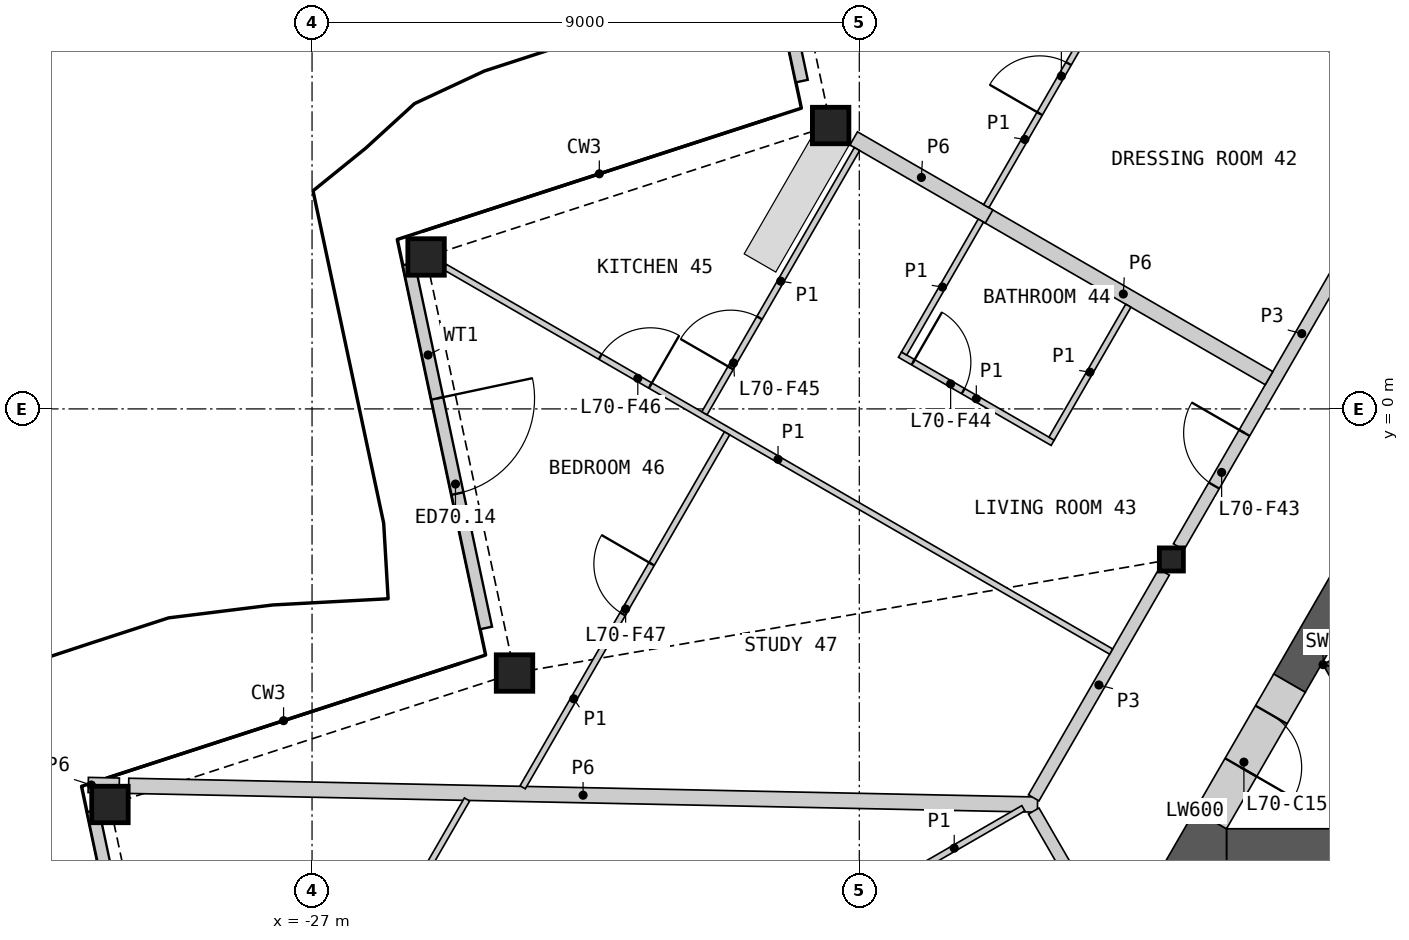
"""IFC4 building model, lengths in metres.
Left out: names, types, materials, properties, quantities, classifications, styles, units other than length and angle.
Written with IfcOpenShell. Run it as: python <this file> out.ifc"""

import sys

from ifc_helpers import new_model, si_unit, direction, frame, frame_2d, origin, origin_2d, place, context, subcontext, project, spatial, polyline, rectangle, hollow_rectangle, i_section, outline, extrude, element, fill, save


model = new_model("IFC4")
c1 = context("Model", 3, precision=1e-05, world=origin(), true_north=direction((0.0, 1.0)))
c2 = subcontext(c1, "Body", "Model", "MODEL_VIEW")
j1 = project(units=[si_unit("LENGTHUNIT", "METRE"), si_unit("PLANEANGLEUNIT", "RADIAN")], contexts=[c1])
p1 = place(None, origin())
s1 = spatial("IfcSite", under=j1, at=p1, CompositionType="ELEMENT")
p2 = place(p1, origin())
s2 = spatial("IfcBuilding", under=s1, at=p2, CompositionType="ELEMENT")
p3 = place(p2, frame((0.0, 0.0, 318.8)))
s3 = spatial("IfcBuildingStorey", under=s2, at=p3, CompositionType="ELEMENT", Elevation=318.8)
for number, where, z_axis, x_axis in (
    (1, (-18.471, 4.661, 0.0), (0.0, 0.0, 1.0), (1.0, 0.0, 0.0)),
    (2, (-25.125, 2.499, 0.0), (0.0, 0.0, 1.0), (1.0, 0.0, 0.0)),
    (3, (-23.67, -4.344, 0.0), (0.0, 0.0, 1.0), (1.0, 0.0, 0.0)),
    (4, (-30.324, -6.506, 0.0), (0.0, 0.0, 1.0), (1.0, 0.0, 0.0)),
):
    element("IfcColumn", number, at=place(p3, frame(where, z_axis=z_axis, x_axis=x_axis)), inside=s3, PredefinedType="COLUMN", context=c2, shape_type="SweptSolid", body=[
        extrude(hollow_rectangle(XDim=0.6, YDim=0.6, WallThickness=0.04, at=origin_2d()), origin(), (0.0, 0.0, 1.0), 3.4),
    ])
p4 = place(p3, frame((-12.868, -2.476, 0.0), z_axis=(0.0, 0.0, 1.0), x_axis=(1.0, 0.0, 0.0)))
e5 = element("IfcColumn", 5, at=p4, inside=s3, PredefinedType="COLUMN", context=c2, shape_type="SweptSolid", body=[
    extrude(i_section(OverallWidth=0.396, OverallDepth=0.381, WebThickness=0.019, FlangeThickness=0.03, at=origin_2d()), origin(), (0.0, 0.0, 1.0), 3.4),
])
p5 = place(p3, frame((-20.217, 11.377, 0.0), z_axis=(0.0, 0.0, 1.0), x_axis=(0.207885951908, -0.978153071354, 0.0)))
e6 = element("IfcWall", 6, at=p5, inside=s3, PredefinedType="SOLIDWALL", context=c2, shape_type="SweptSolid", body=[
    extrude(rectangle(XDim=6.12, YDim=0.2, at=frame_2d((3.06, 0.0))), origin(), (0.0, 0.0, 1.0), 2.488),
])
p6 = place(p5, frame((2.26, 0.0, 0.0)))
e7 = element("IfcOpeningElement", 7, at=p6, cuts=e6, PredefinedType="OPENING", context=c2, shape_type="SweptSolid", body=[
    extrude(rectangle(XDim=1.6, YDim=2.25, at=frame_2d((0.8, 1.125))), frame((0.0, 0.11, 0.0), z_axis=(0.0, -1.0, 0.0), x_axis=(1.0, 0.0, 0.0)), (0.0, 0.0, 1.0), 0.22),
])
p7 = place(p3, frame((-25.41, 2.383, 0.0), z_axis=(0.0, 0.0, 1.0), x_axis=(0.207894064368, -0.978151347185, 0.0)))
e8 = element("IfcWall", 8, at=p7, inside=s3, PredefinedType="SOLIDWALL", context=c2, shape_type="SweptSolid", body=[
    extrude(rectangle(XDim=6.12, YDim=0.2, at=frame_2d((3.06, 0.0))), origin(), (0.0, 0.0, 1.0), 2.488),
])
p8 = place(p7, frame((2.26, 0.0, 0.0)))
e9 = element("IfcOpeningElement", 9, at=p8, cuts=e8, PredefinedType="OPENING", context=c2, shape_type="SweptSolid", body=[
    extrude(rectangle(XDim=1.6, YDim=2.25, at=frame_2d((0.8, 1.125))), frame((0.0, 0.11, 0.0), z_axis=(0.0, -1.0, 0.0), x_axis=(1.0, 0.0, 0.0)), (0.0, 0.0, 1.0), 0.22),
])
p9 = place(p3, frame((-30.603, -6.611, 0.0), z_axis=(0.0, 0.0, 1.0), x_axis=(0.207921893309, -0.978145432072, 0.0)))
e10 = element("IfcWall", 10, at=p9, inside=s3, PredefinedType="SOLIDWALL", context=c2, shape_type="SweptSolid", body=[
    extrude(rectangle(XDim=6.475, YDim=0.2, at=frame_2d((3.237, 0.0))), origin(), (0.0, 0.0, 1.0), 2.488),
])
p10 = place(p9, frame((2.26, 0.0, 0.0)))
e11 = element("IfcOpeningElement", 11, at=p10, cuts=e10, PredefinedType="OPENING", context=c2, shape_type="SweptSolid", body=[
    extrude(rectangle(XDim=1.6, YDim=2.25, at=frame_2d((0.8, 1.125))), frame((0.0, 0.11, 0.0), z_axis=(0.0, -1.0, 0.0), x_axis=(1.0, 0.0, 0.0)), (0.0, 0.0, 1.0), 0.22),
])
p11 = place(p3, origin())
e12 = element("IfcWall", 12, at=p11, inside=s3, PredefinedType="SHEAR", context=c2, shape_type="SweptSolid", body=[
    extrude(outline(polyline([(-5.307, -1.281), (-10.374, -4.206), (-10.032, -4.298), (-5.182, -1.498), (-5.307, -1.281)])), origin(), (0.0, 0.0, 1.0), 3.1),
])
p12 = place(p3, origin())
e13 = element("IfcWall", 13, at=p12, inside=s3, PredefinedType="SHEAR", context=c2, shape_type="SweptSolid", body=[
    extrude(outline(polyline([(-10.374, -4.206), (-8.83, -6.881), (-8.738, -6.539), (-10.032, -4.298), (-10.374, -4.206)])), origin(), (0.0, 0.0, 1.0), 3.1),
])
p13 = place(p3, frame((-11.961, -7.206, 0.0), z_axis=(0.0, 0.0, 1.0), x_axis=(1.0, 0.0, 0.0)))
e14 = element("IfcWall", 14, at=p13, inside=s3, PredefinedType="SHEAR", context=c2, shape_type="SweptSolid", body=[
    extrude(rectangle(XDim=23.921, YDim=0.6, at=frame_2d((11.961, 0.0))), origin(), (0.0, 0.0, 1.0), 3.1),
])
p14 = place(p3, frame((-8.44, -0.208, 0.0), z_axis=(0.0, 0.0, 1.0), x_axis=(-0.500007425856, -0.866021116422, 0.0)))
e15 = element("IfcWall", 15, at=p14, inside=s3, PredefinedType="SHEAR", context=c2, shape_type="SweptSolid", body=[
    extrude(rectangle(XDim=4.969, YDim=0.6, at=frame_2d((2.484, 0.0))), origin(), (0.0, 0.0, 1.0), 3.1),
])
p15 = place(p3, origin())
e16 = element("IfcWall", 16, at=p15, inside=s3, PredefinedType="SHEAR", context=c2, shape_type="SweptSolid", body=[
    extrude(outline(polyline([(-12.48, -6.606), (-11.961, -6.906), (-11.961, -7.506), (-13.0, -7.506), (-12.48, -6.606)])), origin(), (0.0, 0.0, 1.0), 3.1),
])
p16 = place(p3, frame((-10.925, -4.511, 0.0), z_axis=(0.0, 0.0, 1.0), x_axis=(-0.500018667571, -0.866014625789, 0.0)))
e17 = element("IfcWall", 17, at=p16, inside=s3, PredefinedType="SHEAR", context=c2, shape_type="SweptSolid", body=[
    extrude(rectangle(XDim=2.592, YDim=0.6, at=frame_2d((1.296, 0.0))), origin(), (0.0, 0.0, 1.0), 3.1),
])
p17 = place(p16, frame((0.6, 0.0, 0.0)))
e18 = element("IfcOpeningElement", 18, at=p17, cuts=e17, PredefinedType="OPENING", context=c2, shape_type="SweptSolid", body=[
    extrude(rectangle(XDim=1.0, YDim=2.1, at=frame_2d((0.5, 1.05))), frame((0.0, 0.31, 0.0), z_axis=(0.0, -1.0, 0.0), x_axis=(1.0, 0.0, 0.0)), (0.0, 0.0, 1.0), 0.62),
])
p18 = place(p3, frame((-30.016, -6.199, 0.0), z_axis=(0.0, 0.0, 1.0), x_axis=(0.999786619639, -0.02065708573, 0.0)))
e19 = element("IfcWall", 19, at=p18, inside=s3, PredefinedType="PARTITIONING", context=c2, shape_type="SweptSolid", body=[
    extrude(rectangle(XDim=14.951, YDim=0.25, at=frame_2d((7.475, 0.0))), origin(), (0.0, 0.0, 1.0), 2.33),
])
p19 = place(p3, frame((-12.748, -2.269, 0.0), z_axis=(0.0, 0.0, 1.0), x_axis=(0.499984266882, 0.866034487114, 0.0)))
e20 = element("IfcWall", 20, at=p19, inside=s3, PredefinedType="PARTITIONING", context=c2, shape_type="SweptSolid", body=[
    extrude(rectangle(XDim=8.099, YDim=0.2, at=frame_2d((4.049, 0.0))), origin(), (0.0, 0.0, 1.0), 3.1),
])
p20 = place(p19, frame((1.164, 0.0, 0.0)))
e21 = element("IfcOpeningElement", 21, at=p20, cuts=e20, PredefinedType="OPENING", context=c2, shape_type="SweptSolid", body=[
    extrude(rectangle(XDim=1.0, YDim=2.1, at=frame_2d((0.5, 1.05))), frame((0.0, 0.11, 0.0), z_axis=(0.0, -1.0, 0.0), x_axis=(1.0, 0.0, 0.0)), (0.0, 0.0, 1.0), 0.22),
])
p21 = place(p3, frame((-16.055, 3.273, 0.0), z_axis=(0.0, 0.0, 1.0), x_axis=(0.866019581949, -0.500010083578, 0.0)))
e22 = element("IfcWall", 22, at=p21, inside=s3, PredefinedType="PARTITIONING", context=c2, shape_type="SweptSolid", body=[
    extrude(rectangle(XDim=5.535, YDim=0.25, at=frame_2d((2.768, 0.0))), origin(), (0.0, 0.0, 1.0), 2.33),
])
p22 = place(p3, frame((-15.131, -6.397, 0.0), z_axis=(0.0, 0.0, 1.0), x_axis=(0.500003406062, 0.866023437285, 0.0)))
e23 = element("IfcWall", 23, at=p22, inside=s3, PredefinedType="PARTITIONING", context=c2, shape_type="SweptSolid", body=[
    extrude(rectangle(XDim=4.288, YDim=0.2, at=frame_2d((2.144, 0.0))), origin(), (0.0, 0.0, 1.0), 3.1),
])
p23 = place(p3, frame((-15.131, -6.614, 0.0), z_axis=(0.0, 0.0, 1.0), x_axis=(0.499967746641, -0.866044024469, 0.0)))
e24 = element("IfcWall", 24, at=p23, inside=s3, PredefinedType="PARTITIONING", context=c2, shape_type="SweptSolid", body=[
    extrude(rectangle(XDim=3.676, YDim=0.2, at=frame_2d((1.838, 0.0))), origin(), (0.0, 0.0, 1.0), 3.1),
])
p24 = place(p23, frame((2.426, 0.0, 0.0)))
e25 = element("IfcOpeningElement", 25, at=p24, cuts=e24, PredefinedType="OPENING", context=c2, shape_type="SweptSolid", body=[
    extrude(rectangle(XDim=1.0, YDim=2.1, at=frame_2d((0.5, 1.05))), frame((0.0, 0.11, 0.0), z_axis=(0.0, -1.0, 0.0), x_axis=(1.0, 0.0, 0.0)), (0.0, 0.0, 1.0), 0.22),
])
p25 = place(p3, frame((-18.092, 4.449, 0.0), z_axis=(0.0, 0.0, 1.0), x_axis=(0.866043267704, -0.499969057507, 0.0)))
e26 = element("IfcWall", 26, at=p25, inside=s3, PredefinedType="PARTITIONING", context=c2, shape_type="SweptSolid", body=[
    extrude(rectangle(XDim=2.571, YDim=0.25, at=frame_2d((1.286, 0.0))), origin(), (0.0, 0.0, 1.0), 2.33),
])
p26 = place(p3, frame((-30.681, -6.186, 0.0), z_axis=(0.0, 0.0, 1.0), x_axis=(0.999788216533, -0.020579652135, 0.0)))
e27 = element("IfcWall", 27, at=p26, inside=s3, PredefinedType="PARTITIONING", context=c2, shape_type="SweptSolid", body=[
    extrude(rectangle(XDim=0.51, YDim=0.25, at=frame_2d((0.255, 0.0))), origin(), (0.0, 0.0, 1.0), 2.33),
])
p27 = place(p3, frame((-24.815, 2.334, 0.0), z_axis=(0.0, 0.0, 1.0), x_axis=(0.866024591023, -0.500001407741, 0.0)))
e28 = element("IfcWall", 28, at=p27, inside=s3, PredefinedType="PARTITIONING", context=c2, shape_type="SweptSolid", body=[
    extrude(rectangle(XDim=12.652, YDim=0.1, at=frame_2d((6.326, 0.0))), origin(), (0.0, 0.0, 1.0), 2.33),
])
p28 = place(p27, frame((2.95, 0.0, 0.0)))
e29 = element("IfcOpeningElement", 29, at=p28, cuts=e28, PredefinedType="OPENING", context=c2, shape_type="SweptSolid", body=[
    extrude(rectangle(XDim=0.95, YDim=2.1, at=frame_2d((0.475, 1.05))), frame((0.0, 0.06, 0.0), z_axis=(0.0, -1.0, 0.0), x_axis=(1.0, 0.0, 0.0)), (0.0, 0.0, 1.0), 0.12),
])
p29 = place(p3, frame((-23.536, -6.224, 0.0), z_axis=(0.0, 0.0, 1.0), x_axis=(0.500002256251, 0.866024101133, 0.0)))
e30 = element("IfcWall", 30, at=p29, inside=s3, PredefinedType="PARTITIONING", context=c2, shape_type="SweptSolid", body=[
    extrude(rectangle(XDim=6.722, YDim=0.1, at=frame_2d((3.361, 0.0))), origin(), (0.0, 0.0, 1.0), 2.33),
])
p30 = place(p29, frame((3.292, 0.0, 0.0)))
e31 = element("IfcOpeningElement", 31, at=p30, cuts=e30, PredefinedType="OPENING", context=c2, shape_type="SweptSolid", body=[
    extrude(rectangle(XDim=0.95, YDim=2.1, at=frame_2d((0.475, 1.05))), frame((0.0, 0.06, 0.0), z_axis=(0.0, -1.0, 0.0), x_axis=(1.0, 0.0, 0.0)), (0.0, 0.0, 1.0), 0.12),
])
p31 = place(p3, frame((-13.386, 7.729, 0.0), z_axis=(0.0, 0.0, 1.0), x_axis=(0.866034036823, -0.49998504684, 0.0)))
e32 = element("IfcWall", 32, at=p31, inside=s3, PredefinedType="PARTITIONING", context=c2, shape_type="SweptSolid", body=[
    extrude(rectangle(XDim=5.312, YDim=0.1, at=frame_2d((2.656, 0.0))), origin(), (0.0, 0.0, 1.0), 2.33),
])
p32 = place(p3, frame((-15.912, 3.335, 0.0), z_axis=(0.0, 0.0, 1.0), x_axis=(0.49999906822, 0.866025941747, 0.0)))
e33 = element("IfcWall", 33, at=p32, inside=s3, PredefinedType="PARTITIONING", context=c2, shape_type="SweptSolid", body=[
    extrude(rectangle(XDim=5.068, YDim=0.1, at=frame_2d((2.534, 0.0))), origin(), (0.0, 0.0, 1.0), 2.33),
])
p33 = place(p32, frame((1.757, 0.0, 0.0)))
e34 = element("IfcOpeningElement", 34, at=p33, cuts=e33, PredefinedType="OPENING", context=c2, shape_type="SweptSolid", body=[
    extrude(rectangle(XDim=0.95, YDim=2.1, at=frame_2d((0.475, 1.05))), frame((0.0, 0.06, 0.0), z_axis=(0.0, -1.0, 0.0), x_axis=(1.0, 0.0, 0.0)), (0.0, 0.0, 1.0), 0.12),
])
p34 = place(p3, frame((-20.547, -0.072, 0.0), z_axis=(0.0, 0.0, 1.0), x_axis=(0.499969537666, 0.866042990507, 0.0)))
e35 = element("IfcWall", 35, at=p34, inside=s3, PredefinedType="PARTITIONING", context=c2, shape_type="SweptSolid", body=[
    extrude(rectangle(XDim=5.018, YDim=0.1, at=frame_2d((2.509, 0.0))), origin(), (0.0, 0.0, 1.0), 2.33),
])
p35 = place(p34, frame((0.862, 0.0, 0.0)))
e36 = element("IfcOpeningElement", 36, at=p35, cuts=e35, PredefinedType="OPENING", context=c2, shape_type="SweptSolid", body=[
    extrude(rectangle(XDim=0.95, YDim=2.1, at=frame_2d((0.475, 1.05))), frame((0.0, 0.06, 0.0), z_axis=(0.0, -1.0, 0.0), x_axis=(1.0, 0.0, 0.0)), (0.0, 0.0, 1.0), 0.12),
])
p36 = place(p3, frame((-26.736, -10.38, 0.0), z_axis=(0.0, 0.0, 1.0), x_axis=(0.500024700597, 0.866011142419, 0.0)))
e37 = element("IfcWall", 37, at=p36, inside=s3, PredefinedType="PARTITIONING", context=c2, shape_type="SweptSolid", body=[
    extrude(rectangle(XDim=4.568, YDim=0.1, at=frame_2d((2.284, 0.0))), origin(), (0.0, 0.0, 1.0), 2.33),
])
p37 = place(p36, frame((0.652, 0.0, 0.0)))
e38 = element("IfcOpeningElement", 38, at=p37, cuts=e37, PredefinedType="OPENING", context=c2, shape_type="SweptSolid", body=[
    extrude(rectangle(XDim=0.95, YDim=2.1, at=frame_2d((0.475, 1.05))), frame((0.0, 0.06, 0.0), z_axis=(0.0, -1.0, 0.0), x_axis=(1.0, 0.0, 0.0)), (0.0, 0.0, 1.0), 0.12),
])
p38 = place(p3, frame((-17.331, 0.892, 0.0), z_axis=(0.0, 0.0, 1.0), x_axis=(0.866032775405, -0.499987231761, 0.0)))
e39 = element("IfcWall", 39, at=p38, inside=s3, PredefinedType="PARTITIONING", context=c2, shape_type="SweptSolid", body=[
    extrude(rectangle(XDim=2.9, YDim=0.1, at=frame_2d((1.45, 0.0))), origin(), (0.0, 0.0, 1.0), 2.33),
])
p39 = place(p38, frame((0.25, 0.0, 0.0)))
e40 = element("IfcOpeningElement", 40, at=p39, cuts=e39, PredefinedType="OPENING", context=c2, shape_type="SweptSolid", body=[
    extrude(rectangle(XDim=0.95, YDim=2.1, at=frame_2d((0.475, 1.05))), frame((0.0, 0.06, 0.0), z_axis=(0.0, -1.0, 0.0), x_axis=(1.0, 0.0, 0.0)), (0.0, 0.0, 1.0), 0.12),
])
for number, where, z_axis, x_axis in (
    (41, (-14.838, -0.489, 0.0), (0.0, 0.0, 1.0), (0.5, 0.866, 0.0)),
    (42, (-17.263, 0.911, 0.0), (0.0, 0.0, 1.0), (0.5, 0.866, 0.0)),
):
    element("IfcWall", number, at=place(p3, frame(where, z_axis=z_axis, x_axis=x_axis)), inside=s3, PredefinedType="PARTITIONING", context=c2, shape_type="SweptSolid", body=[
        extrude(rectangle(XDim=2.525, YDim=0.1, at=frame_2d((1.262, 0.0))), origin(), (0.0, 0.0, 1.0), 2.33),
    ])
p40 = place(p3, frame((-17.575, -7.881, 0.0), z_axis=(0.0, 0.0, 1.0), x_axis=(0.866013657776, 0.500020344131, 0.0)))
e43 = element("IfcWall", 43, at=p40, inside=s3, PredefinedType="PARTITIONING", context=c2, shape_type="SweptSolid", body=[
    extrude(rectangle(XDim=2.625, YDim=0.1, at=frame_2d((1.312, 0.0))), origin(), (0.0, 0.0, 1.0), 2.33),
])
p41 = place(p8, origin())
e44 = element("IfcDoor", 44, at=p41, inside=s3, OperationType="DOUBLE_DOOR_SINGLE_SWING", PredefinedType="DOOR", context=c2, shape_type="SweptSolid", body=[
    extrude(rectangle(XDim=1.6, YDim=2.25, at=frame_2d((0.8, 1.125))), frame((0.0, 0.025, 0.0), z_axis=(0.0, -1.0, 0.0), x_axis=(1.0, 0.0, 0.0)), (0.0, 0.0, 1.0), 0.05),
])
fill(e9, e44)
p42 = place(p17, origin())
e45 = element("IfcDoor", 45, at=p42, inside=s3, OperationType="SINGLE_SWING_RIGHT", PredefinedType="DOOR", context=c2, shape_type="SweptSolid", body=[
    extrude(rectangle(XDim=1.0, YDim=2.1, at=frame_2d((0.5, 1.05))), frame((0.0, 0.055, 0.0), z_axis=(0.0, -1.0, 0.0), x_axis=(1.0, 0.0, 0.0)), (0.0, 0.0, 1.0), 0.05),
])
fill(e18, e45)
p43 = place(p33, origin())
e46 = element("IfcDoor", 46, at=p43, inside=s3, OperationType="SINGLE_SWING_LEFT", PredefinedType="DOOR", context=c2, shape_type="SweptSolid", body=[
    extrude(rectangle(XDim=0.95, YDim=2.1, at=frame_2d((0.475, 1.05))), frame((0.0, 0.025, 0.0), z_axis=(0.0, -1.0, 0.0), x_axis=(1.0, 0.0, 0.0)), (0.0, 0.0, 1.0), 0.05),
])
fill(e34, e46)
p44 = place(p20, origin())
e47 = element("IfcDoor", 47, at=p44, inside=s3, OperationType="SINGLE_SWING_RIGHT", PredefinedType="DOOR", context=c2, shape_type="SweptSolid", body=[
    extrude(rectangle(XDim=1.0, YDim=2.1, at=frame_2d((0.5, 1.05))), frame((0.0, 0.025, 0.0), z_axis=(0.0, -1.0, 0.0), x_axis=(1.0, 0.0, 0.0)), (0.0, 0.0, 1.0), 0.05),
])
fill(e21, e47)
p45 = place(p39, origin())
e48 = element("IfcDoor", 48, at=p45, inside=s3, OperationType="SINGLE_SWING_LEFT", PredefinedType="DOOR", context=c2, shape_type="SweptSolid", body=[
    extrude(rectangle(XDim=0.95, YDim=2.1, at=frame_2d((0.475, 1.05))), frame((0.0, 0.025, 0.0), z_axis=(0.0, -1.0, 0.0), x_axis=(1.0, 0.0, 0.0)), (0.0, 0.0, 1.0), 0.05),
])
fill(e40, e48)
p46 = place(p35, origin())
e49 = element("IfcDoor", 49, at=p46, inside=s3, OperationType="SINGLE_SWING_LEFT", PredefinedType="DOOR", context=c2, shape_type="SweptSolid", body=[
    extrude(rectangle(XDim=0.95, YDim=2.1, at=frame_2d((0.475, 1.05))), frame((0.0, 0.025, 0.0), z_axis=(0.0, -1.0, 0.0), x_axis=(1.0, 0.0, 0.0)), (0.0, 0.0, 1.0), 0.05),
])
fill(e36, e49)
p47 = place(p28, origin())
e50 = element("IfcDoor", 50, at=p47, inside=s3, OperationType="SINGLE_SWING_RIGHT", PredefinedType="DOOR", context=c2, shape_type="SweptSolid", body=[
    extrude(rectangle(XDim=0.95, YDim=2.1, at=frame_2d((0.475, 1.05))), frame((0.0, 0.025, 0.0), z_axis=(0.0, -1.0, 0.0), x_axis=(1.0, 0.0, 0.0)), (0.0, 0.0, 1.0), 0.05),
])
fill(e29, e50)
p48 = place(p30, origin())
e51 = element("IfcDoor", 51, at=p48, inside=s3, OperationType="SINGLE_SWING_RIGHT", PredefinedType="DOOR", context=c2, shape_type="SweptSolid", body=[
    extrude(rectangle(XDim=0.95, YDim=2.1, at=frame_2d((0.475, 1.05))), frame((0.0, 0.025, 0.0), z_axis=(0.0, -1.0, 0.0), x_axis=(1.0, 0.0, 0.0)), (0.0, 0.0, 1.0), 0.05),
])
fill(e31, e51)
save(model, sys.argv[1])
